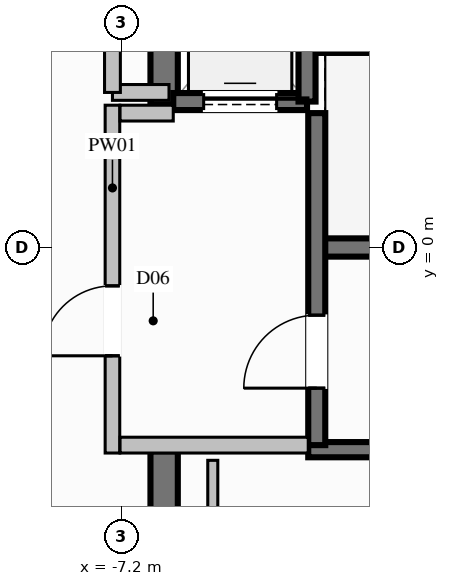
"""IFC4 building model, lengths in metres.
Left out: names, types, materials, properties, quantities, classifications, styles, units other than length and angle.
Written with IfcOpenShell. Run it as: python <this file> out.ifc"""

import sys

from ifc_helpers import new_model, si_unit, direction, frame, frame_2d, origin, place, context, subcontext, project, spatial, rectangle, extrude, element, fill, save


model = new_model("IFC4")
c1 = context("Model", 3, precision=1e-05, world=origin(), true_north=direction((0.0, 1.0)))
c2 = subcontext(c1, "Body", "Model", "MODEL_VIEW")
j1 = project(units=[si_unit("LENGTHUNIT", "METRE"), si_unit("PLANEANGLEUNIT", "RADIAN")], contexts=[c1])
p1 = place(None, origin())
s1 = spatial("IfcSite", under=j1, at=p1, CompositionType="ELEMENT")
p2 = place(p1, origin())
s2 = spatial("IfcBuilding", under=s1, at=p2, CompositionType="ELEMENT")
p3 = place(p2, frame((0.0, 0.0, 262.0)))
s3 = spatial("IfcBuildingStorey", under=s2, at=p3, CompositionType="ELEMENT", Elevation=262.0)
p4 = place(p3, frame((-3.99, 0.0, 0.0), z_axis=(0.0, 0.0, 1.0), x_axis=(1.0, 0.0, 0.0)))
e1 = element("IfcWall", 1, at=p4, inside=s3, PredefinedType="SHEAR", context=c2, shape_type="SweptSolid", body=[
    extrude(rectangle(XDim=7.98, YDim=0.3, at=frame_2d((3.99, 0.0))), origin(), (0.0, 0.0, 1.0), 4.8),
])
for number, where, z_axis, x_axis in (
    (2, (-4.13, -3.325, 0.0), (0.0, 0.0, 1.0), (1.0, 0.0, 0.0)),
    (3, (-4.13, 3.325, 0.0), (0.0, 0.0, 1.0), (1.0, 0.0, 0.0)),
):
    element("IfcWall", number, at=place(p3, frame(where, z_axis=z_axis, x_axis=x_axis)), inside=s3, PredefinedType="SOLIDWALL", context=c2, shape_type="SweptSolid", body=[
        extrude(rectangle(XDim=8.26, YDim=0.25, at=frame_2d((4.13, 0.0))), origin(), (0.0, 0.0, 1.0), 4.8),
    ])
p5 = place(p3, frame((-6.5, 2.35, 0.0), z_axis=(0.0, 0.0, 1.0), x_axis=(0.0, 1.0, 0.0)))
e4 = element("IfcWall", 4, at=p5, inside=s3, PredefinedType="SHEAR", context=c2, shape_type="SweptSolid", body=[
    extrude(rectangle(XDim=3.975, YDim=0.45, at=frame_2d((1.987, 0.0))), origin(), (0.0, 0.0, 1.0), 4.8),
])
p6 = place(p3, frame((-6.5, -6.325, 0.0), z_axis=(0.0, 0.0, 1.0), x_axis=(0.0, 1.0, 0.0)))
e5 = element("IfcWall", 5, at=p6, inside=s3, PredefinedType="SHEAR", context=c2, shape_type="SweptSolid", body=[
    extrude(rectangle(XDim=2.975, YDim=0.45, at=frame_2d((1.487, 0.0))), origin(), (0.0, 0.0, 1.0), 4.8),
])
p7 = place(p3, frame((-6.35, 2.4, 0.0), z_axis=(0.0, 0.0, 1.0), x_axis=(1.0, 0.0, 0.0)))
e6 = element("IfcWall", 6, at=p7, inside=s3, PredefinedType="SOLIDWALL", context=c2, shape_type="SweptSolid", body=[
    extrude(rectangle(XDim=2.2, YDim=0.28, at=frame_2d((1.1, 0.0))), origin(), (0.0, 0.0, 1.0), 4.57),
])
p8 = place(p7, frame((0.5, 0.0, 0.0)))
e7 = element("IfcOpeningElement", 7, at=p8, cuts=e6, PredefinedType="OPENING", context=c2, shape_type="SweptSolid", body=[
    extrude(rectangle(XDim=1.2, YDim=2.2, at=frame_2d((0.6, 1.1))), frame((0.0, 0.15, 0.0), z_axis=(0.0, -1.0, 0.0), x_axis=(1.0, 0.0, 0.0)), (0.0, 0.0, 1.0), 0.3),
])
p9 = place(p3, frame((-4.15, 2.4, 0.0), z_axis=(0.0, 0.0, 1.0), x_axis=(0.0, 1.0, 0.0)))
e8 = element("IfcWall", 8, at=p9, inside=s3, PredefinedType="SOLIDWALL", context=c2, shape_type="SweptSolid", body=[
    extrude(rectangle(XDim=2.7, YDim=0.28, at=frame_2d((1.35, 0.0))), origin(), (0.0, 0.0, 1.0), 4.57),
])
p10 = place(p3, frame((-3.99, -3.25, 0.0), z_axis=(0.0, 0.0, 1.0), x_axis=(0.0, 1.0, 0.0)))
e9 = element("IfcWall", 9, at=p10, inside=s3, PredefinedType="SOLIDWALL", context=c2, shape_type="SweptSolid", body=[
    extrude(rectangle(XDim=5.46, YDim=0.28, at=frame_2d((2.73, 0.0))), origin(), (0.0, 0.0, 1.0), 4.57),
])
p11 = place(p10, frame((0.937, 0.0, 0.0)))
e10 = element("IfcOpeningElement", 10, at=p11, cuts=e9, PredefinedType="OPENING", context=c2, shape_type="SweptSolid", body=[
    extrude(rectangle(XDim=1.2, YDim=2.2, at=frame_2d((0.6, 1.1))), frame((0.0, 0.15, 0.0), z_axis=(0.0, -1.0, 0.0), x_axis=(1.0, 0.0, 0.0)), (0.0, 0.0, 1.0), 0.3),
])
p12 = place(p3, frame((-7.35, -3.38, 0.0), z_axis=(0.0, 0.0, 1.0), x_axis=(0.0, 1.0, 0.0)))
e11 = element("IfcWall", 11, at=p12, inside=s3, PredefinedType="PARTITIONING", context=c2, shape_type="SweptSolid", body=[
    extrude(rectangle(XDim=5.72, YDim=0.24, at=frame_2d((2.86, 0.0))), origin(), (0.0, 0.0, 1.0), 3.455),
])
p13 = place(p12, frame((1.599, 0.0, 0.0)))
e12 = element("IfcOpeningElement", 12, at=p13, cuts=e11, PredefinedType="OPENING", context=c2, shape_type="SweptSolid", body=[
    extrude(rectangle(XDim=1.15, YDim=2.2, at=frame_2d((0.575, 1.1))), frame((0.0, 0.13, 0.0), z_axis=(0.0, -1.0, 0.0), x_axis=(1.0, 0.0, 0.0)), (0.0, 0.0, 1.0), 0.26),
])
p14 = place(p3, frame((-7.225, -3.25, 0.0), z_axis=(0.0, 0.0, 1.0), x_axis=(1.0, 0.0, 0.0)))
e13 = element("IfcWall", 13, at=p14, inside=s3, PredefinedType="PARTITIONING", context=c2, shape_type="SweptSolid", body=[
    extrude(rectangle(XDim=3.095, YDim=0.26, at=frame_2d((1.548, 0.0))), origin(), (0.0, 0.0, 1.0), 4.57),
])
p15 = place(p3, frame((-7.225, 2.21, 0.0), z_axis=(0.0, 0.0, 1.0), x_axis=(1.0, 0.0, 0.0)))
e14 = element("IfcWall", 14, at=p15, inside=s3, PredefinedType="PARTITIONING", context=c2, shape_type="SweptSolid", body=[
    extrude(rectangle(XDim=0.875, YDim=0.26, at=frame_2d((0.438, 0.0))), origin(), (0.0, 0.0, 1.0), 4.57),
])
p16 = place(p3, frame((-7.35, 2.55, 0.0), z_axis=(0.0, 0.0, 1.0), x_axis=(1.0, 0.0, 0.0)))
e15 = element("IfcWall", 15, at=p16, inside=s3, PredefinedType="PARTITIONING", context=c2, shape_type="SweptSolid", body=[
    extrude(rectangle(XDim=0.93, YDim=0.26, at=frame_2d((0.465, 0.0))), origin(), (0.0, 0.0, 1.0), 4.57),
])
p17 = place(p3, frame((-7.35, 2.55, 0.0), z_axis=(0.0, 0.0, 1.0), x_axis=(0.0, 1.0, 0.0)))
e16 = element("IfcWall", 16, at=p17, inside=s3, PredefinedType="PARTITIONING", context=c2, shape_type="SweptSolid", body=[
    extrude(rectangle(XDim=2.4, YDim=0.26, at=frame_2d((1.2, 0.0))), origin(), (0.0, 0.0, 1.0), 3.455),
])
p18 = place(p17, frame((0.775, 0.0, 0.0)))
e17 = element("IfcOpeningElement", 17, at=p18, cuts=e16, PredefinedType="OPENING", context=c2, shape_type="SweptSolid", body=[
    extrude(rectangle(XDim=0.85, YDim=2.05, at=frame_2d((0.425, 1.025))), frame((0.0, 0.14, 0.0), z_axis=(0.0, -1.0, 0.0), x_axis=(1.0, 0.0, 0.0)), (0.0, 0.0, 1.0), 0.28),
])
p19 = place(p3, frame((-5.7, -3.5, 0.0), z_axis=(0.0, 0.0, 1.0), x_axis=(0.0, -1.0, 0.0)))
e18 = element("IfcWall", 18, at=p19, inside=s3, PredefinedType="PARTITIONING", context=c2, shape_type="SweptSolid", body=[
    extrude(rectangle(XDim=3.35, YDim=0.165, at=frame_2d((1.675, 0.0))), origin(), (0.0, 0.0, 1.0), 3.455),
])
p20 = place(p8, origin())
e19 = element("IfcDoor", 19, at=p20, inside=s3, OperationType="SLIDING_TO_LEFT", PredefinedType="DOOR", context=c2, shape_type="SweptSolid", body=[
    extrude(rectangle(XDim=1.2, YDim=2.2, at=frame_2d((0.6, 1.1))), frame((0.0, 0.025, 0.0), z_axis=(0.0, -1.0, 0.0), x_axis=(1.0, 0.0, 0.0)), (0.0, 0.0, 1.0), 0.05),
])
fill(e7, e19)
p21 = place(p11, origin())
e20 = element("IfcDoor", 20, at=p21, inside=s3, OperationType="SINGLE_SWING_LEFT", PredefinedType="DOOR", context=c2, shape_type="SweptSolid", body=[
    extrude(rectangle(XDim=1.2, YDim=2.2, at=frame_2d((0.6, 1.1))), frame((0.0, 0.025, 0.0), z_axis=(0.0, -1.0, 0.0), x_axis=(1.0, 0.0, 0.0)), (0.0, 0.0, 1.0), 0.05),
])
fill(e10, e20)
p22 = place(p13, origin())
e21 = element("IfcDoor", 21, at=p22, inside=s3, OperationType="SINGLE_SWING_LEFT", PredefinedType="DOOR", context=c2, shape_type="SweptSolid", body=[
    extrude(rectangle(XDim=1.15, YDim=2.2, at=frame_2d((0.575, 1.1))), frame((0.0, 0.025, 0.0), z_axis=(0.0, -1.0, 0.0), x_axis=(1.0, 0.0, 0.0)), (0.0, 0.0, 1.0), 0.05),
])
fill(e12, e21)
save(model, sys.argv[1])
